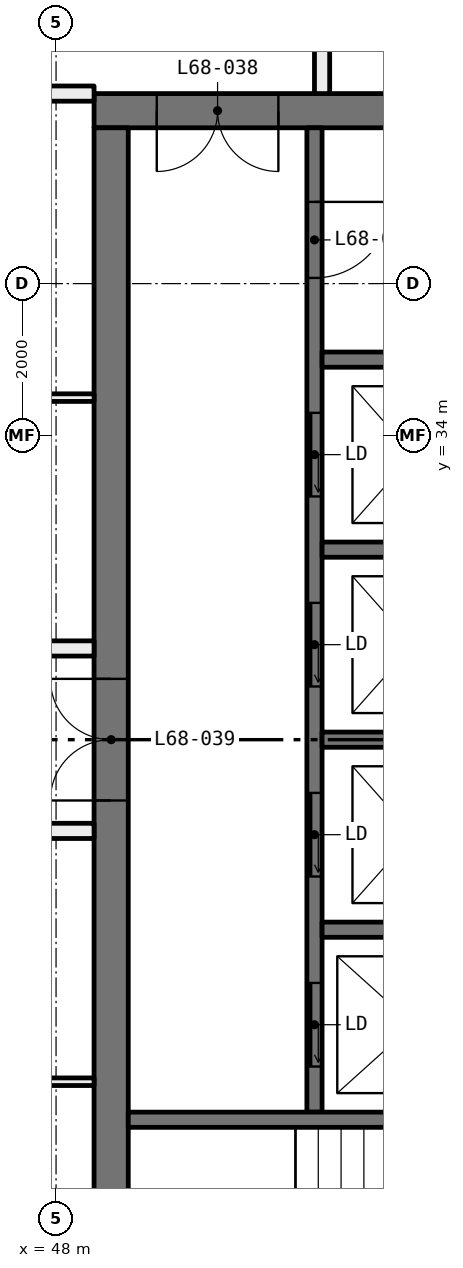
"""IFC4 building model, lengths in metres.
Left out: names, types, materials, properties, quantities, classifications, styles, units other than length and angle.
Written with IfcOpenShell. Run it as: python <this file> out.ifc"""

import sys

from ifc_helpers import new_model, si_unit, direction, frame, frame_2d, origin, place, context, subcontext, project, spatial, rectangle, extrude, element, fill, save


model = new_model("IFC4")
c1 = context("Model", 3, precision=1e-05, world=origin(), true_north=direction((0.0, 1.0)))
c2 = subcontext(c1, "Body", "Model", "MODEL_VIEW")
j1 = project(units=[si_unit("LENGTHUNIT", "METRE"), si_unit("PLANEANGLEUNIT", "RADIAN")], contexts=[c1])
p1 = place(None, origin())
s1 = spatial("IfcSite", under=j1, at=p1, CompositionType="ELEMENT")
p2 = place(p1, origin())
s2 = spatial("IfcBuilding", under=s1, at=p2, CompositionType="ELEMENT")
p3 = place(p2, frame((0.0, 0.0, 252.45)))
s3 = spatial("IfcBuildingStorey", under=s2, at=p3, CompositionType="ELEMENT", Elevation=252.45)
p4 = place(p3, frame((48.5, 25.5, 0.0), z_axis=(0.0, 0.0, 1.0), x_axis=(-1.0, 0.0, 0.0)))
e1 = element("IfcWall", 1, at=p4, inside=s3, PredefinedType="PARTITIONING", context=c2, shape_type="SweptSolid", body=[
    extrude(rectangle(XDim=6.45, YDim=0.1, at=frame_2d((3.225, 0.0))), origin(), (0.0, 0.0, 1.0), 3.05),
])
p5 = place(p4, frame((2.775, 0.0, 0.0)))
e2 = element("IfcOpeningElement", 2, at=p5, cuts=e1, PredefinedType="OPENING", context=c2, shape_type="SweptSolid", body=[
    extrude(rectangle(XDim=0.9, YDim=2.1, at=frame_2d((0.45, 1.05))), frame((0.0, 0.06, 0.0), z_axis=(0.0, -1.0, 0.0), x_axis=(1.0, 0.0, 0.0)), (0.0, 0.0, 1.0), 0.12),
])
p6 = place(p3, frame((48.5, 28.8, 0.0), z_axis=(0.0, 0.0, 1.0), x_axis=(-1.0, 0.0, 0.0)))
e3 = element("IfcWall", 3, at=p6, inside=s3, PredefinedType="PARTITIONING", context=c2, shape_type="SweptSolid", body=[
    extrude(rectangle(XDim=2.4, YDim=0.2, at=frame_2d((1.2, 0.0))), origin(), (0.0, 0.0, 1.0), 3.05),
])
p7 = place(p3, frame((51.5, 41.9, 0.0), z_axis=(0.0, 0.0, 1.0), x_axis=(0.0, -1.0, 0.0)))
e4 = element("IfcWall", 4, at=p7, inside=s3, PredefinedType="PARTITIONING", context=c2, shape_type="SweptSolid", body=[
    extrude(rectangle(XDim=3.4, YDim=0.2, at=frame_2d((1.7, 0.0))), origin(), (0.0, 0.0, 1.0), 3.05),
])
p8 = place(p7, frame((1.2, 0.0, 0.0)))
e5 = element("IfcOpeningElement", 5, at=p8, cuts=e4, PredefinedType="OPENING", context=c2, shape_type="SweptSolid", body=[
    extrude(rectangle(XDim=1.0, YDim=2.1, at=frame_2d((0.5, 1.05))), frame((0.0, 0.11, 0.0), z_axis=(0.0, -1.0, 0.0), x_axis=(1.0, 0.0, 0.0)), (0.0, 0.0, 1.0), 0.22),
])
p9 = place(p3, frame((42.05, 34.5, 0.0), z_axis=(0.0, 0.0, 1.0), x_axis=(1.0, 0.0, 0.0)))
e6 = element("IfcWall", 6, at=p9, inside=s3, PredefinedType="PARTITIONING", context=c2, shape_type="SweptSolid", body=[
    extrude(rectangle(XDim=6.45, YDim=0.1, at=frame_2d((3.225, 0.0))), origin(), (0.0, 0.0, 1.0), 3.05),
])
p10 = place(p9, frame((2.775, 0.0, 0.0)))
e7 = element("IfcOpeningElement", 7, at=p10, cuts=e6, PredefinedType="OPENING", context=c2, shape_type="SweptSolid", body=[
    extrude(rectangle(XDim=0.9, YDim=2.1, at=frame_2d((0.45, 1.05))), frame((0.0, 0.06, 0.0), z_axis=(0.0, -1.0, 0.0), x_axis=(1.0, 0.0, 0.0)), (0.0, 0.0, 1.0), 0.12),
])
p11 = place(p3, frame((48.5, 38.5, 0.0), z_axis=(0.0, 0.0, 1.0), x_axis=(-1.0, 0.0, 0.0)))
e8 = element("IfcWall", 8, at=p11, inside=s3, PredefinedType="PARTITIONING", context=c2, shape_type="SweptSolid", body=[
    extrude(rectangle(XDim=2.4, YDim=0.2, at=frame_2d((1.2, 0.0))), origin(), (0.0, 0.0, 1.0), 3.05),
])
p12 = place(p3, frame((46.2, 31.2, 0.0), z_axis=(0.0, 0.0, 1.0), x_axis=(1.0, 0.0, 0.0)))
e9 = element("IfcWall", 9, at=p12, inside=s3, PredefinedType="PARTITIONING", context=c2, shape_type="SweptSolid", body=[
    extrude(rectangle(XDim=2.3, YDim=0.2, at=frame_2d((1.15, 0.0))), origin(), (0.0, 0.0, 1.0), 3.05),
])
p13 = place(p3, frame((59.5, 38.275, 0.0), z_axis=(0.0, 0.0, 1.0), x_axis=(-1.0, 0.0, 0.0)))
e10 = element("IfcWall", 10, at=p13, inside=s3, PredefinedType="SHEAR", context=c2, shape_type="SweptSolid", body=[
    extrude(rectangle(XDim=11.0, YDim=0.45, at=frame_2d((5.5, 0.0))), origin(), (0.0, 0.0, 1.0), 3.05),
])
p14 = place(p13, frame((8.575, 0.0, 0.0)))
e11 = element("IfcOpeningElement", 11, at=p14, cuts=e10, PredefinedType="OPENING", context=c2, shape_type="SweptSolid", body=[
    extrude(rectangle(XDim=1.6, YDim=2.1, at=frame_2d((0.8, 1.05))), frame((0.0, 0.235, 0.0), z_axis=(0.0, -1.0, 0.0), x_axis=(1.0, 0.0, 0.0)), (0.0, 0.0, 1.0), 0.47),
])
p15 = place(p3, frame((48.725, 21.95, 0.0), z_axis=(0.0, 0.0, 1.0), x_axis=(0.0, 1.0, 0.0)))
e12 = element("IfcWall", 12, at=p15, inside=s3, PredefinedType="SHEAR", context=c2, shape_type="SweptSolid", body=[
    extrude(rectangle(XDim=16.1, YDim=0.45, at=frame_2d((8.05, 0.0))), origin(), (0.0, 0.0, 1.0), 3.05),
])
p16 = place(p15, frame((7.25, 0.0, 0.0)))
e13 = element("IfcOpeningElement", 13, at=p16, cuts=e12, PredefinedType="OPENING", context=c2, shape_type="SweptSolid", body=[
    extrude(rectangle(XDim=1.6, YDim=2.1, at=frame_2d((0.8, 1.05))), frame((0.0, 0.235, 0.0), z_axis=(0.0, -1.0, 0.0), x_axis=(1.0, 0.0, 0.0)), (0.0, 0.0, 1.0), 0.47),
])
p17 = place(p3, frame((51.4, 25.1, 0.0), z_axis=(0.0, 0.0, 1.0), x_axis=(0.0, 1.0, 0.0)))
e14 = element("IfcWall", 14, at=p17, inside=s3, PredefinedType="SOLIDWALL", context=c2, shape_type="SweptSolid", body=[
    extrude(rectangle(XDim=12.95, YDim=0.2, at=frame_2d((6.475, 0.0))), origin(), (0.0, 0.0, 1.0), 3.05),
])
p18 = place(p17, frame((0.6, 0.0, 0.0)))
e15 = element("IfcOpeningElement", 15, at=p18, cuts=e14, PredefinedType="OPENING", context=c2, shape_type="SweptSolid", body=[
    extrude(rectangle(XDim=1.1, YDim=2.1, at=frame_2d((0.55, 1.05))), frame((0.0, 0.11, 0.0), z_axis=(0.0, -1.0, 0.0), x_axis=(1.0, 0.0, 0.0)), (0.0, 0.0, 1.0), 0.22),
])
p19 = place(p17, frame((3.1, 0.0, 0.0)))
e16 = element("IfcOpeningElement", 16, at=p19, cuts=e14, PredefinedType="OPENING", context=c2, shape_type="SweptSolid", body=[
    extrude(rectangle(XDim=1.1, YDim=2.1, at=frame_2d((0.55, 1.05))), frame((0.0, 0.11, 0.0), z_axis=(0.0, -1.0, 0.0), x_axis=(1.0, 0.0, 0.0)), (0.0, 0.0, 1.0), 0.22),
])
p20 = place(p17, frame((5.6, 0.0, 0.0)))
e17 = element("IfcOpeningElement", 17, at=p20, cuts=e14, PredefinedType="OPENING", context=c2, shape_type="SweptSolid", body=[
    extrude(rectangle(XDim=1.1, YDim=2.1, at=frame_2d((0.55, 1.05))), frame((0.0, 0.11, 0.0), z_axis=(0.0, -1.0, 0.0), x_axis=(1.0, 0.0, 0.0)), (0.0, 0.0, 1.0), 0.22),
])
p21 = place(p17, frame((8.1, 0.0, 0.0)))
e18 = element("IfcOpeningElement", 18, at=p21, cuts=e14, PredefinedType="OPENING", context=c2, shape_type="SweptSolid", body=[
    extrude(rectangle(XDim=1.1, YDim=2.1, at=frame_2d((0.55, 1.05))), frame((0.0, 0.11, 0.0), z_axis=(0.0, -1.0, 0.0), x_axis=(1.0, 0.0, 0.0)), (0.0, 0.0, 1.0), 0.22),
])
p22 = place(p17, frame((10.975, 0.0, 0.0)))
e19 = element("IfcOpeningElement", 19, at=p22, cuts=e14, PredefinedType="OPENING", context=c2, shape_type="SweptSolid", body=[
    extrude(rectangle(XDim=1.0, YDim=2.1, at=frame_2d((0.5, 1.05))), frame((0.0, 0.11, 0.0), z_axis=(0.0, -1.0, 0.0), x_axis=(1.0, 0.0, 0.0)), (0.0, 0.0, 1.0), 0.22),
])
for number, where, z_axis, x_axis in (
    (20, (56.5, 25.0, 0.0), (0.0, 0.0, 1.0), (-1.0, 0.0, 0.0)),
    (21, (59.05, 35.0, 0.0), (0.0, 0.0, 1.0), (-1.0, 0.0, 0.0)),
):
    element("IfcWall", number, at=place(p3, frame(where, z_axis=z_axis, x_axis=x_axis)), inside=s3, PredefinedType="SOLIDWALL", context=c2, shape_type="SweptSolid", body=[
        extrude(rectangle(XDim=7.55, YDim=0.2, at=frame_2d((3.775, 0.0))), origin(), (0.0, 0.0, 1.0), 3.05),
    ])
for number, where, z_axis, x_axis in (
    (22, (53.9, 27.5, 0.0), (0.0, 0.0, 1.0), (-1.0, 0.0, 0.0)),
    (23, (53.9, 30.0, 0.0), (0.0, 0.0, 1.0), (-1.0, 0.0, 0.0)),
    (24, (53.9, 32.5, 0.0), (0.0, 0.0, 1.0), (-1.0, 0.0, 0.0)),
):
    element("IfcWall", number, at=place(p3, frame(where, z_axis=z_axis, x_axis=x_axis)), inside=s3, PredefinedType="SOLIDWALL", context=c2, shape_type="SweptSolid", body=[
        extrude(rectangle(XDim=2.4, YDim=0.2, at=frame_2d((1.2, 0.0))), origin(), (0.0, 0.0, 1.0), 3.05),
    ])
p23 = place(p18, origin())
e25 = element("IfcDoor", 25, at=p23, inside=s3, OperationType="SLIDING_TO_LEFT", PredefinedType="DOOR", context=c2, shape_type="SweptSolid", body=[
    extrude(rectangle(XDim=1.1, YDim=2.1, at=frame_2d((0.55, 1.05))), frame((0.0, 0.025, 0.0), z_axis=(0.0, -1.0, 0.0), x_axis=(1.0, 0.0, 0.0)), (0.0, 0.0, 1.0), 0.05),
])
fill(e15, e25)
p24 = place(p19, origin())
e26 = element("IfcDoor", 26, at=p24, inside=s3, OperationType="SLIDING_TO_LEFT", PredefinedType="DOOR", context=c2, shape_type="SweptSolid", body=[
    extrude(rectangle(XDim=1.1, YDim=2.1, at=frame_2d((0.55, 1.05))), frame((0.0, 0.025, 0.0), z_axis=(0.0, -1.0, 0.0), x_axis=(1.0, 0.0, 0.0)), (0.0, 0.0, 1.0), 0.05),
])
fill(e16, e26)
p25 = place(p20, origin())
e27 = element("IfcDoor", 27, at=p25, inside=s3, OperationType="SLIDING_TO_LEFT", PredefinedType="DOOR", context=c2, shape_type="SweptSolid", body=[
    extrude(rectangle(XDim=1.1, YDim=2.1, at=frame_2d((0.55, 1.05))), frame((0.0, 0.025, 0.0), z_axis=(0.0, -1.0, 0.0), x_axis=(1.0, 0.0, 0.0)), (0.0, 0.0, 1.0), 0.05),
])
fill(e17, e27)
p26 = place(p21, origin())
e28 = element("IfcDoor", 28, at=p26, inside=s3, OperationType="SLIDING_TO_LEFT", PredefinedType="DOOR", context=c2, shape_type="SweptSolid", body=[
    extrude(rectangle(XDim=1.1, YDim=2.1, at=frame_2d((0.55, 1.05))), frame((0.0, 0.025, 0.0), z_axis=(0.0, -1.0, 0.0), x_axis=(1.0, 0.0, 0.0)), (0.0, 0.0, 1.0), 0.05),
])
fill(e18, e28)
p27 = place(p22, frame((1.0, 0.0, 0.0), x_axis=(-1.0, 0.0, 0.0)))
e29 = element("IfcDoor", 29, at=p27, inside=s3, OperationType="SINGLE_SWING_RIGHT", PredefinedType="DOOR", context=c2, shape_type="SweptSolid", body=[
    extrude(rectangle(XDim=1.0, YDim=2.1, at=frame_2d((0.5, 1.05))), frame((0.0, 0.025, 0.0), z_axis=(0.0, -1.0, 0.0), x_axis=(1.0, 0.0, 0.0)), (0.0, 0.0, 1.0), 0.05),
])
fill(e19, e29)
p28 = place(p14, origin())
e30 = element("IfcDoor", 30, at=p28, inside=s3, OperationType="DOUBLE_DOOR_SINGLE_SWING", PredefinedType="DOOR", context=c2, shape_type="SweptSolid", body=[
    extrude(rectangle(XDim=1.6, YDim=2.1, at=frame_2d((0.8, 1.05))), frame((0.0, 0.025, 0.0), z_axis=(0.0, -1.0, 0.0), x_axis=(1.0, 0.0, 0.0)), (0.0, 0.0, 1.0), 0.05),
])
fill(e11, e30)
p29 = place(p16, origin())
e31 = element("IfcDoor", 31, at=p29, inside=s3, OperationType="DOUBLE_DOOR_SINGLE_SWING", PredefinedType="DOOR", context=c2, shape_type="SweptSolid", body=[
    extrude(rectangle(XDim=1.6, YDim=2.1, at=frame_2d((0.8, 1.05))), frame((0.0, 0.025, 0.0), z_axis=(0.0, -1.0, 0.0), x_axis=(1.0, 0.0, 0.0)), (0.0, 0.0, 1.0), 0.05),
])
fill(e13, e31)
save(model, sys.argv[1])
